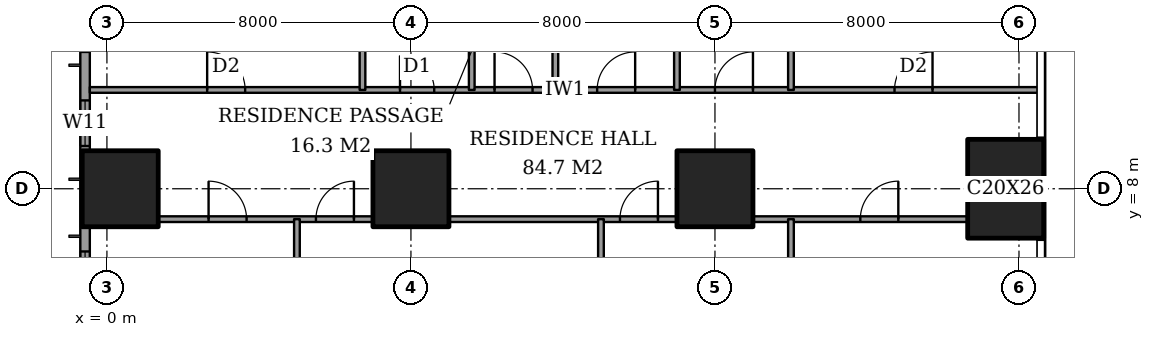
"""IFC4 building model, lengths in metres.
Left out: names, types, materials, properties, quantities, classifications, styles, units other than length and angle.
Written with IfcOpenShell. Run it as: python <this file> out.ifc"""

import sys

from ifc_helpers import new_model, si_unit, direction, frame, frame_2d, origin, origin_2d, place, context, subcontext, project, spatial, rectangle, extrude, element, fill, save


model = new_model("IFC4")
c1 = context("Model", 3, precision=1e-05, world=origin(), true_north=direction((0.0, 1.0)))
c2 = subcontext(c1, "Body", "Model", "MODEL_VIEW")
j1 = project(units=[si_unit("LENGTHUNIT", "METRE"), si_unit("PLANEANGLEUNIT", "RADIAN")], contexts=[c1])
p1 = place(None, origin())
s1 = spatial("IfcSite", under=j1, at=p1, CompositionType="ELEMENT")
p2 = place(p1, origin())
s2 = spatial("IfcBuilding", under=s1, at=p2, CompositionType="ELEMENT")
p3 = place(p2, frame((0.0, 0.0, 164.6)))
s3 = spatial("IfcBuildingStorey", under=s2, at=p3, CompositionType="ELEMENT", Elevation=164.6)
for number, where, z_axis, x_axis in (
    (1, (0.35, 8.0, 0.0), (0.0, 0.0, 1.0), (1.0, 0.0, 0.0)),
    (2, (8.0, 8.0, 0.0), (0.0, 0.0, 1.0), (1.0, 0.0, 0.0)),
    (3, (16.0, 8.0, 0.0), (0.0, 0.0, 1.0), (1.0, 0.0, 0.0)),
):
    element("IfcColumn", number, at=place(p3, frame(where, z_axis=z_axis, x_axis=x_axis)), inside=s3, PredefinedType="COLUMN", context=c2, shape_type="SweptSolid", body=[
        extrude(rectangle(XDim=2.0, YDim=2.0, at=origin_2d()), origin(), (0.0, 0.0, 1.0), 3.6),
    ])
p4 = place(p3, frame((23.65, 8.0, 0.0), z_axis=(0.0, 0.0, 1.0), x_axis=(1.0, 0.0, 0.0)))
e4 = element("IfcColumn", 4, at=p4, inside=s3, PredefinedType="COLUMN", context=c2, shape_type="SweptSolid", body=[
    extrude(rectangle(XDim=2.0, YDim=2.6, at=origin_2d()), origin(), (0.0, 0.0, 1.0), 3.6),
])
p5 = place(p3, frame((-0.575, 44.825, 0.0), z_axis=(0.0, 0.0, 1.0), x_axis=(0.0, -1.0, 0.0)))
e5 = element("IfcWall", 5, at=p5, inside=s3, PredefinedType="SOLIDWALL", context=c2, shape_type="SweptSolid", body=[
    extrude(rectangle(XDim=41.65, YDim=0.25, at=frame_2d((20.825, 0.0))), origin(), (0.0, 0.0, 1.0), 3.6),
])
p6 = place(p5, frame((0.775, 0.0, 0.4)))
e6 = element("IfcOpeningElement", 6, at=p6, cuts=e5, PredefinedType="OPENING", context=c2, shape_type="SweptSolid", body=[
    extrude(rectangle(XDim=2.4, YDim=2.2, at=frame_2d((1.2, 1.1))), frame((0.0, 0.135, 0.0), z_axis=(0.0, -1.0, 0.0), x_axis=(1.0, 0.0, 0.0)), (0.0, 0.0, 1.0), 0.27),
])
p7 = place(p5, frame((6.1, 0.0, 0.4)))
e7 = element("IfcOpeningElement", 7, at=p7, cuts=e5, PredefinedType="OPENING", context=c2, shape_type="SweptSolid", body=[
    extrude(rectangle(XDim=1.2, YDim=2.2, at=frame_2d((0.6, 1.1))), frame((0.0, 0.135, 0.0), z_axis=(0.0, -1.0, 0.0), x_axis=(1.0, 0.0, 0.0)), (0.0, 0.0, 1.0), 0.27),
])
p8 = place(p5, frame((8.425, 0.0, 0.4)))
e8 = element("IfcOpeningElement", 8, at=p8, cuts=e5, PredefinedType="OPENING", context=c2, shape_type="SweptSolid", body=[
    extrude(rectangle(XDim=2.4, YDim=2.2, at=frame_2d((1.2, 1.1))), frame((0.0, 0.135, 0.0), z_axis=(0.0, -1.0, 0.0), x_axis=(1.0, 0.0, 0.0)), (0.0, 0.0, 1.0), 0.27),
])
p9 = place(p5, frame((15.625, 0.0, 0.4)))
e9 = element("IfcOpeningElement", 9, at=p9, cuts=e5, PredefinedType="OPENING", context=c2, shape_type="SweptSolid", body=[
    extrude(rectangle(XDim=2.4, YDim=2.2, at=frame_2d((1.2, 1.1))), frame((0.0, 0.135, 0.0), z_axis=(0.0, -1.0, 0.0), x_axis=(1.0, 0.0, 0.0)), (0.0, 0.0, 1.0), 0.27),
])
p10 = place(p5, frame((23.625, 0.0, 0.4)))
e10 = element("IfcOpeningElement", 10, at=p10, cuts=e5, PredefinedType="OPENING", context=c2, shape_type="SweptSolid", body=[
    extrude(rectangle(XDim=2.4, YDim=2.2, at=frame_2d((1.2, 1.1))), frame((0.0, 0.135, 0.0), z_axis=(0.0, -1.0, 0.0), x_axis=(1.0, 0.0, 0.0)), (0.0, 0.0, 1.0), 0.27),
])
p11 = place(p5, frame((30.825, 0.0, 0.4)))
e11 = element("IfcOpeningElement", 11, at=p11, cuts=e5, PredefinedType="OPENING", context=c2, shape_type="SweptSolid", body=[
    extrude(rectangle(XDim=2.4, YDim=2.2, at=frame_2d((1.2, 1.1))), frame((0.0, 0.135, 0.0), z_axis=(0.0, -1.0, 0.0), x_axis=(1.0, 0.0, 0.0)), (0.0, 0.0, 1.0), 0.27),
])
p12 = place(p5, frame((34.5, 0.0, 0.4)))
e12 = element("IfcOpeningElement", 12, at=p12, cuts=e5, PredefinedType="OPENING", context=c2, shape_type="SweptSolid", body=[
    extrude(rectangle(XDim=1.2, YDim=2.2, at=frame_2d((0.6, 1.1))), frame((0.0, 0.135, 0.0), z_axis=(0.0, -1.0, 0.0), x_axis=(1.0, 0.0, 0.0)), (0.0, 0.0, 1.0), 0.27),
])
p13 = place(p5, frame((38.475, 0.0, 0.4)))
e13 = element("IfcOpeningElement", 13, at=p13, cuts=e5, PredefinedType="OPENING", context=c2, shape_type="SweptSolid", body=[
    extrude(rectangle(XDim=2.4, YDim=2.2, at=frame_2d((1.2, 1.1))), frame((0.0, 0.135, 0.0), z_axis=(0.0, -1.0, 0.0), x_axis=(1.0, 0.0, 0.0)), (0.0, 0.0, 1.0), 0.27),
])
p14 = place(p3, frame((1.35, 7.2, 0.0), z_axis=(0.0, 0.0, 1.0), x_axis=(1.0, 0.0, 0.0)))
e14 = element("IfcWall", 14, at=p14, inside=s3, PredefinedType="PARTITIONING", context=c2, shape_type="SweptSolid", body=[
    extrude(rectangle(XDim=5.65, YDim=0.15, at=frame_2d((2.825, 0.0))), origin(), (0.0, 0.0, 1.0), 3.35),
])
p15 = place(p14, frame((1.325, 0.0, 0.0)))
e15 = element("IfcOpeningElement", 15, at=p15, cuts=e14, PredefinedType="OPENING", context=c2, shape_type="SweptSolid", body=[
    extrude(rectangle(XDim=1.0, YDim=2.1, at=frame_2d((0.5, 1.05))), frame((0.0, 0.085, 0.0), z_axis=(0.0, -1.0, 0.0), x_axis=(1.0, 0.0, 0.0)), (0.0, 0.0, 1.0), 0.17),
])
p16 = place(p14, frame((4.15, 0.0, 0.0)))
e16 = element("IfcOpeningElement", 16, at=p16, cuts=e14, PredefinedType="OPENING", context=c2, shape_type="SweptSolid", body=[
    extrude(rectangle(XDim=1.0, YDim=2.1, at=frame_2d((0.5, 1.05))), frame((0.0, 0.085, 0.0), z_axis=(0.0, -1.0, 0.0), x_axis=(1.0, 0.0, 0.0)), (0.0, 0.0, 1.0), 0.17),
])
p17 = place(p3, frame((9.0, 7.2, 0.0), z_axis=(0.0, 0.0, 1.0), x_axis=(1.0, 0.0, 0.0)))
e17 = element("IfcWall", 17, at=p17, inside=s3, PredefinedType="PARTITIONING", context=c2, shape_type="SweptSolid", body=[
    extrude(rectangle(XDim=6.0, YDim=0.15, at=frame_2d((3.0, 0.0))), origin(), (0.0, 0.0, 1.0), 3.35),
])
p18 = place(p17, frame((4.5, 0.0, 0.0)))
e18 = element("IfcOpeningElement", 18, at=p18, cuts=e17, PredefinedType="OPENING", context=c2, shape_type="SweptSolid", body=[
    extrude(rectangle(XDim=1.0, YDim=2.1, at=frame_2d((0.5, 1.05))), frame((0.0, 0.085, 0.0), z_axis=(0.0, -1.0, 0.0), x_axis=(1.0, 0.0, 0.0)), (0.0, 0.0, 1.0), 0.17),
])
p19 = place(p3, frame((17.0, 7.2, 0.0), z_axis=(0.0, 0.0, 1.0), x_axis=(1.0, 0.0, 0.0)))
e19 = element("IfcWall", 19, at=p19, inside=s3, PredefinedType="PARTITIONING", context=c2, shape_type="SweptSolid", body=[
    extrude(rectangle(XDim=5.65, YDim=0.15, at=frame_2d((2.825, 0.0))), origin(), (0.0, 0.0, 1.0), 3.35),
])
p20 = place(p19, frame((2.825, 0.0, 0.0)))
e20 = element("IfcOpeningElement", 20, at=p20, cuts=e19, PredefinedType="OPENING", context=c2, shape_type="SweptSolid", body=[
    extrude(rectangle(XDim=1.0, YDim=2.1, at=frame_2d((0.5, 1.05))), frame((0.0, 0.085, 0.0), z_axis=(0.0, -1.0, 0.0), x_axis=(1.0, 0.0, 0.0)), (0.0, 0.0, 1.0), 0.17),
])
p21 = place(p3, frame((-0.45, 10.6, 0.0), z_axis=(0.0, 0.0, 1.0), x_axis=(1.0, 0.0, 0.0)))
e21 = element("IfcWall", 21, at=p21, inside=s3, PredefinedType="PARTITIONING", context=c2, shape_type="SweptSolid", body=[
    extrude(rectangle(XDim=25.011, YDim=0.15, at=frame_2d((12.505, 0.0))), origin(), (0.0, 0.0, 1.0), 3.35),
])
p22 = place(p21, frame((10.65, 0.0, 0.0)))
e22 = element("IfcOpeningElement", 22, at=p22, cuts=e21, PredefinedType="OPENING", context=c2, shape_type="SweptSolid", body=[
    extrude(rectangle(XDim=1.0, YDim=2.1, at=frame_2d((0.5, 1.05))), frame((0.0, 0.085, 0.0), z_axis=(0.0, -1.0, 0.0), x_axis=(1.0, 0.0, 0.0)), (0.0, 0.0, 1.0), 0.17),
])
p23 = place(p21, frame((3.087, 0.0, 0.0)))
e23 = element("IfcOpeningElement", 23, at=p23, cuts=e21, PredefinedType="OPENING", context=c2, shape_type="SweptSolid", body=[
    extrude(rectangle(XDim=1.0, YDim=2.1, at=frame_2d((0.5, 1.05))), frame((0.0, 0.085, 0.0), z_axis=(0.0, -1.0, 0.0), x_axis=(1.0, 0.0, 0.0)), (0.0, 0.0, 1.0), 0.17),
])
p24 = place(p21, frame((8.163, 0.0, 0.0)))
e24 = element("IfcOpeningElement", 24, at=p24, cuts=e21, PredefinedType="OPENING", context=c2, shape_type="SweptSolid", body=[
    extrude(rectangle(XDim=0.9, YDim=2.1, at=frame_2d((0.45, 1.05))), frame((0.0, 0.085, 0.0), z_axis=(0.0, -1.0, 0.0), x_axis=(1.0, 0.0, 0.0)), (0.0, 0.0, 1.0), 0.17),
])
p25 = place(p21, frame((13.35, 0.0, 0.0)))
e25 = element("IfcOpeningElement", 25, at=p25, cuts=e21, PredefinedType="OPENING", context=c2, shape_type="SweptSolid", body=[
    extrude(rectangle(XDim=1.0, YDim=2.1, at=frame_2d((0.5, 1.05))), frame((0.0, 0.085, 0.0), z_axis=(0.0, -1.0, 0.0), x_axis=(1.0, 0.0, 0.0)), (0.0, 0.0, 1.0), 0.17),
])
p26 = place(p21, frame((16.45, 0.0, 0.0)))
e26 = element("IfcOpeningElement", 26, at=p26, cuts=e21, PredefinedType="OPENING", context=c2, shape_type="SweptSolid", body=[
    extrude(rectangle(XDim=1.0, YDim=2.1, at=frame_2d((0.5, 1.05))), frame((0.0, 0.085, 0.0), z_axis=(0.0, -1.0, 0.0), x_axis=(1.0, 0.0, 0.0)), (0.0, 0.0, 1.0), 0.17),
])
p27 = place(p21, frame((21.175, 0.0, 0.0)))
e27 = element("IfcOpeningElement", 27, at=p27, cuts=e21, PredefinedType="OPENING", context=c2, shape_type="SweptSolid", body=[
    extrude(rectangle(XDim=1.0, YDim=2.1, at=frame_2d((0.5, 1.05))), frame((0.0, 0.085, 0.0), z_axis=(0.0, -1.0, 0.0), x_axis=(1.0, 0.0, 0.0)), (0.0, 0.0, 1.0), 0.17),
])
p28 = place(p3, frame((5.0, -0.45, 0.0), z_axis=(0.0, 0.0, 1.0), x_axis=(0.0, 1.0, 0.0)))
e28 = element("IfcWall", 28, at=p28, inside=s3, PredefinedType="PARTITIONING", context=c2, shape_type="SweptSolid", body=[
    extrude(rectangle(XDim=7.65, YDim=0.15, at=frame_2d((3.825, 0.0))), origin(), (0.0, 0.0, 1.0), 3.35),
])
p29 = place(p3, frame((6.725, 10.6, 0.0), z_axis=(0.0, 0.0, 1.0), x_axis=(0.0, 1.0, 0.0)))
e29 = element("IfcWall", 29, at=p29, inside=s3, PredefinedType="PARTITIONING", context=c2, shape_type="SweptSolid", body=[
    extrude(rectangle(XDim=4.2, YDim=0.15, at=frame_2d((2.1, 0.0))), origin(), (0.0, 0.0, 1.0), 3.35),
])
p30 = place(p3, frame((9.6, 10.6, 0.0), z_axis=(0.0, 0.0, 1.0), x_axis=(0.0, 1.0, 0.0)))
e30 = element("IfcWall", 30, at=p30, inside=s3, PredefinedType="PARTITIONING", context=c2, shape_type="SweptSolid", body=[
    extrude(rectangle(XDim=11.0, YDim=0.15, at=frame_2d((5.5, 0.0))), origin(), (0.0, 0.0, 1.0), 3.35),
])
p31 = place(p30, frame((8.7, 0.0, 0.0)))
e31 = element("IfcOpeningElement", 31, at=p31, cuts=e30, PredefinedType="OPENING", context=c2, shape_type="SweptSolid", body=[
    extrude(rectangle(XDim=1.0, YDim=2.1, at=frame_2d((0.5, 1.05))), frame((0.0, 0.085, 0.0), z_axis=(0.0, -1.0, 0.0), x_axis=(1.0, 0.0, 0.0)), (0.0, 0.0, 1.0), 0.17),
])
p32 = place(p3, frame((11.8, 10.6, 0.0), z_axis=(0.0, 0.0, 1.0), x_axis=(0.0, 1.0, 0.0)))
e32 = element("IfcWall", 32, at=p32, inside=s3, PredefinedType="PARTITIONING", context=c2, shape_type="SweptSolid", body=[
    extrude(rectangle(XDim=7.4, YDim=0.15, at=frame_2d((3.7, 0.0))), origin(), (0.0, 0.0, 1.0), 3.35),
])
p33 = place(p3, frame((13.0, -0.45, 0.0), z_axis=(0.0, 0.0, 1.0), x_axis=(0.0, 1.0, 0.0)))
e33 = element("IfcWall", 33, at=p33, inside=s3, PredefinedType="PARTITIONING", context=c2, shape_type="SweptSolid", body=[
    extrude(rectangle(XDim=7.65, YDim=0.15, at=frame_2d((3.825, 0.0))), origin(), (0.0, 0.0, 1.0), 3.35),
])
p34 = place(p3, frame((15.0, 10.6, 0.0), z_axis=(0.0, 0.0, 1.0), x_axis=(0.0, 1.0, 0.0)))
e34 = element("IfcWall", 34, at=p34, inside=s3, PredefinedType="PARTITIONING", context=c2, shape_type="SweptSolid", body=[
    extrude(rectangle(XDim=4.2, YDim=0.15, at=frame_2d((2.1, 0.0))), origin(), (0.0, 0.0, 1.0), 3.35),
])
p35 = place(p3, frame((18.0, -0.45, 0.0), z_axis=(0.0, 0.0, 1.0), x_axis=(0.0, 1.0, 0.0)))
e35 = element("IfcWall", 35, at=p35, inside=s3, PredefinedType="PARTITIONING", context=c2, shape_type="SweptSolid", body=[
    extrude(rectangle(XDim=7.65, YDim=0.15, at=frame_2d((3.825, 0.0))), origin(), (0.0, 0.0, 1.0), 3.35),
])
p36 = place(p3, frame((18.0, 10.6, 0.0), z_axis=(0.0, 0.0, 1.0), x_axis=(0.0, 1.0, 0.0)))
e36 = element("IfcWall", 36, at=p36, inside=s3, PredefinedType="PARTITIONING", context=c2, shape_type="SweptSolid", body=[
    extrude(rectangle(XDim=7.4, YDim=0.15, at=frame_2d((3.7, 0.0))), origin(), (0.0, 0.0, 1.0), 3.35),
])
p37 = place(p12, origin())
e37 = element("IfcWindow", 37, at=p37, inside=s3, PartitioningType="SINGLE_PANEL", PredefinedType="WINDOW", context=c2, shape_type="SweptSolid", body=[
    extrude(rectangle(XDim=1.2, YDim=2.2, at=frame_2d((0.6, 1.1))), frame((0.0, 0.03, 0.0), z_axis=(0.0, -1.0, 0.0), x_axis=(1.0, 0.0, 0.0)), (0.0, 0.0, 1.0), 0.06),
])
fill(e12, e37)
p38 = place(p13, origin())
e38 = element("IfcWindow", 38, at=p38, inside=s3, PartitioningType="SINGLE_PANEL", PredefinedType="WINDOW", context=c2, shape_type="SweptSolid", body=[
    extrude(rectangle(XDim=2.4, YDim=2.2, at=frame_2d((1.2, 1.1))), frame((0.0, 0.03, 0.0), z_axis=(0.0, -1.0, 0.0), x_axis=(1.0, 0.0, 0.0)), (0.0, 0.0, 1.0), 0.06),
])
fill(e13, e38)
p39 = place(p15, origin())
e39 = element("IfcDoor", 39, at=p39, inside=s3, OperationType="SINGLE_SWING_RIGHT", PredefinedType="DOOR", context=c2, shape_type="SweptSolid", body=[
    extrude(rectangle(XDim=1.0, YDim=2.1, at=frame_2d((0.5, 1.05))), frame((0.0, 0.025, 0.0), z_axis=(0.0, -1.0, 0.0), x_axis=(1.0, 0.0, 0.0)), (0.0, 0.0, 1.0), 0.05),
])
fill(e15, e39)
p40 = place(p16, origin())
e40 = element("IfcDoor", 40, at=p40, inside=s3, OperationType="SINGLE_SWING_LEFT", PredefinedType="DOOR", context=c2, shape_type="SweptSolid", body=[
    extrude(rectangle(XDim=1.0, YDim=2.1, at=frame_2d((0.5, 1.05))), frame((0.0, 0.025, 0.0), z_axis=(0.0, -1.0, 0.0), x_axis=(1.0, 0.0, 0.0)), (0.0, 0.0, 1.0), 0.05),
])
fill(e16, e40)
p41 = place(p18, origin())
e41 = element("IfcDoor", 41, at=p41, inside=s3, OperationType="SINGLE_SWING_LEFT", PredefinedType="DOOR", context=c2, shape_type="SweptSolid", body=[
    extrude(rectangle(XDim=1.0, YDim=2.1, at=frame_2d((0.5, 1.05))), frame((0.0, 0.025, 0.0), z_axis=(0.0, -1.0, 0.0), x_axis=(1.0, 0.0, 0.0)), (0.0, 0.0, 1.0), 0.05),
])
fill(e18, e41)
p42 = place(p20, origin())
e42 = element("IfcDoor", 42, at=p42, inside=s3, OperationType="SINGLE_SWING_LEFT", PredefinedType="DOOR", context=c2, shape_type="SweptSolid", body=[
    extrude(rectangle(XDim=1.0, YDim=2.1, at=frame_2d((0.5, 1.05))), frame((0.0, 0.025, 0.0), z_axis=(0.0, -1.0, 0.0), x_axis=(1.0, 0.0, 0.0)), (0.0, 0.0, 1.0), 0.05),
])
fill(e20, e42)
p43 = place(p22, origin())
e43 = element("IfcDoor", 43, at=p43, inside=s3, OperationType="SINGLE_SWING_RIGHT", PredefinedType="DOOR", context=c2, shape_type="SweptSolid", body=[
    extrude(rectangle(XDim=1.0, YDim=2.1, at=frame_2d((0.5, 1.05))), frame((0.0, 0.025, 0.0), z_axis=(0.0, -1.0, 0.0), x_axis=(1.0, 0.0, 0.0)), (0.0, 0.0, 1.0), 0.05),
])
fill(e22, e43)
p44 = place(p23, origin())
e44 = element("IfcDoor", 44, at=p44, inside=s3, OperationType="SINGLE_SWING_RIGHT", PredefinedType="DOOR", context=c2, shape_type="SweptSolid", body=[
    extrude(rectangle(XDim=1.0, YDim=2.1, at=frame_2d((0.5, 1.05))), frame((0.0, 0.025, 0.0), z_axis=(0.0, -1.0, 0.0), x_axis=(1.0, 0.0, 0.0)), (0.0, 0.0, 1.0), 0.05),
])
fill(e23, e44)
p45 = place(p24, origin())
e45 = element("IfcDoor", 45, at=p45, inside=s3, OperationType="SINGLE_SWING_RIGHT", PredefinedType="DOOR", context=c2, shape_type="SweptSolid", body=[
    extrude(rectangle(XDim=0.9, YDim=2.1, at=frame_2d((0.45, 1.05))), frame((0.0, 0.025, 0.0), z_axis=(0.0, -1.0, 0.0), x_axis=(1.0, 0.0, 0.0)), (0.0, 0.0, 1.0), 0.05),
])
fill(e24, e45)
p46 = place(p25, origin())
e46 = element("IfcDoor", 46, at=p46, inside=s3, OperationType="SINGLE_SWING_LEFT", PredefinedType="DOOR", context=c2, shape_type="SweptSolid", body=[
    extrude(rectangle(XDim=1.0, YDim=2.1, at=frame_2d((0.5, 1.05))), frame((0.0, 0.025, 0.0), z_axis=(0.0, -1.0, 0.0), x_axis=(1.0, 0.0, 0.0)), (0.0, 0.0, 1.0), 0.05),
])
fill(e25, e46)
p47 = place(p26, origin())
e47 = element("IfcDoor", 47, at=p47, inside=s3, OperationType="SINGLE_SWING_LEFT", PredefinedType="DOOR", context=c2, shape_type="SweptSolid", body=[
    extrude(rectangle(XDim=1.0, YDim=2.1, at=frame_2d((0.5, 1.05))), frame((0.0, 0.025, 0.0), z_axis=(0.0, -1.0, 0.0), x_axis=(1.0, 0.0, 0.0)), (0.0, 0.0, 1.0), 0.05),
])
fill(e26, e47)
p48 = place(p27, origin())
e48 = element("IfcDoor", 48, at=p48, inside=s3, OperationType="SINGLE_SWING_LEFT", PredefinedType="DOOR", context=c2, shape_type="SweptSolid", body=[
    extrude(rectangle(XDim=1.0, YDim=2.1, at=frame_2d((0.5, 1.05))), frame((0.0, 0.025, 0.0), z_axis=(0.0, -1.0, 0.0), x_axis=(1.0, 0.0, 0.0)), (0.0, 0.0, 1.0), 0.05),
])
fill(e27, e48)
save(model, sys.argv[1])
